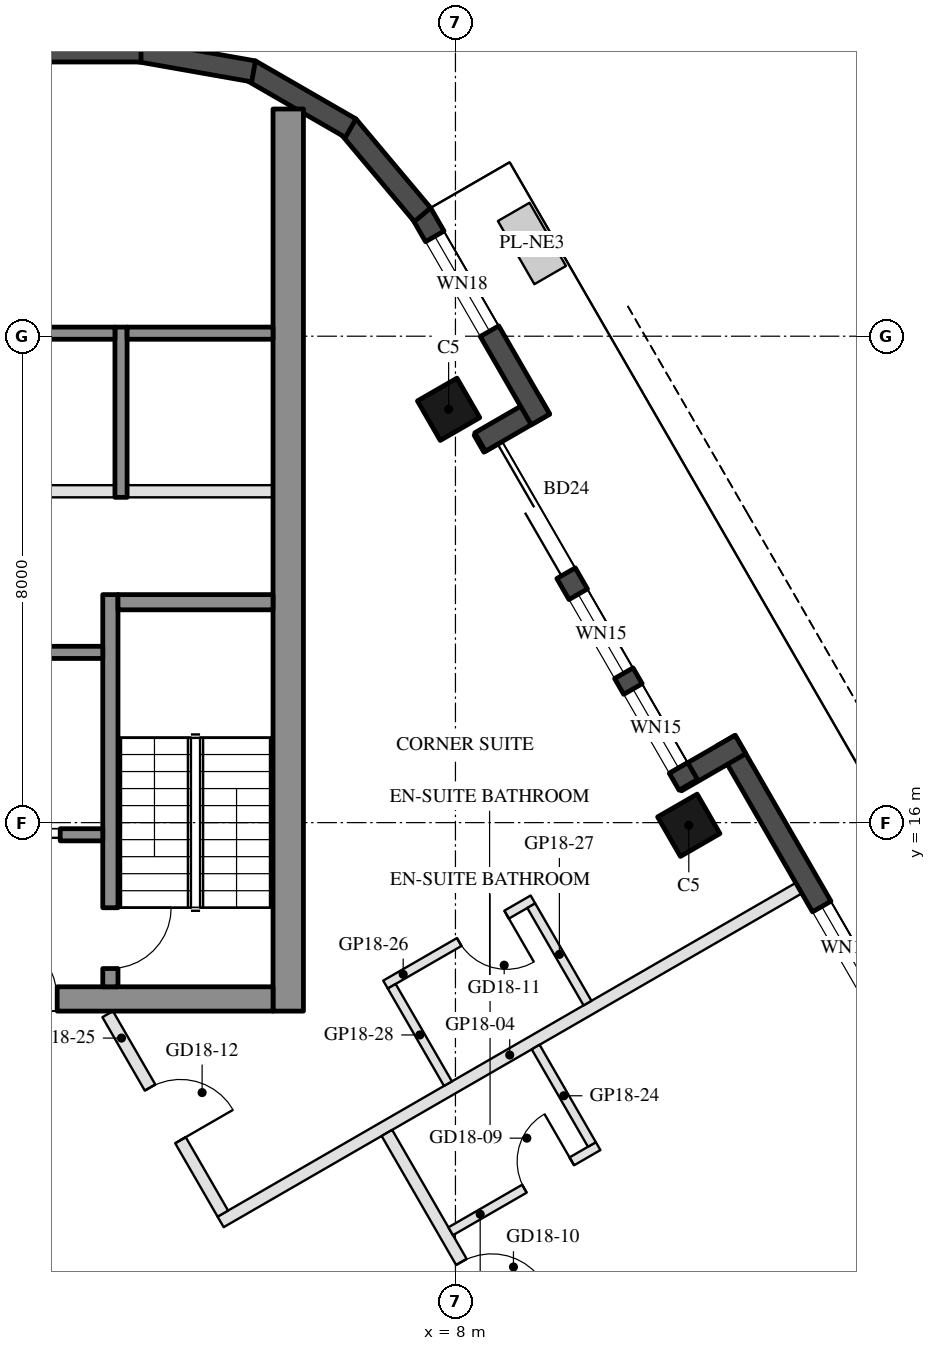
"""IFC4 building model, lengths in metres.
Left out: names, types, materials, properties, quantities, classifications, styles, units other than length and angle.
Written with IfcOpenShell. Run it as: python <this file> out.ifc"""

import sys

from ifc_helpers import new_model, si_unit, direction, frame, frame_2d, origin, origin_2d, place, context, subcontext, project, spatial, rectangle, hollow_rectangle, extrude, element, fill, save


model = new_model("IFC4")
c1 = context("Model", 3, precision=1e-05, world=origin(), true_north=direction((0.0, 1.0)))
c2 = subcontext(c1, "Body", "Model", "MODEL_VIEW")
j1 = project(units=[si_unit("LENGTHUNIT", "METRE"), si_unit("PLANEANGLEUNIT", "RADIAN")], contexts=[c1])
p1 = place(None, origin())
s1 = spatial("IfcSite", under=j1, at=p1, CompositionType="ELEMENT")
p2 = place(p1, origin())
s2 = spatial("IfcBuilding", under=s1, at=p2, CompositionType="ELEMENT")
p3 = place(p2, frame((0.0, 0.0, 198.4)))
s3 = spatial("IfcBuildingStorey", under=s2, at=p3, CompositionType="ELEMENT", Elevation=198.4)
for number, where, z_axis, x_axis in (
    (1, (11.838, 15.957, 0.0), (0.0, 0.0, 1.0), (-0.5, 0.866, 0.0)),
    (2, (7.888, 22.798, 0.0), (0.0, 0.0, 1.0), (-0.5, 0.866, 0.0)),
):
    element("IfcColumn", number, at=place(p3, frame(where, z_axis=z_axis, x_axis=x_axis)), inside=s3, PredefinedType="COLUMN", context=c2, shape_type="SweptSolid", body=[
        extrude(hollow_rectangle(XDim=0.75, YDim=0.75, WallThickness=0.035, at=origin_2d()), origin(), (0.0, 0.0, 1.0), 3.7),
    ])
p4 = place(p3, frame((17.299, 8.948, 0.0), z_axis=(0.0, 0.0, 1.0), x_axis=(-0.500010041276, 0.866019606374, 0.0)))
e3 = element("IfcWall", 3, at=p4, inside=s3, PredefinedType="SOLIDWALL", context=c2, shape_type="SweptSolid", body=[
    extrude(rectangle(XDim=9.7, YDim=0.35, at=frame_2d((4.85, 0.0))), origin(), (0.0, 0.0, 1.0), 3.55),
])
p5 = place(p4, frame((1.737, 0.0, 0.0)))
e4 = element("IfcOpeningElement", 4, at=p5, cuts=e3, PredefinedType="OPENING", context=c2, shape_type="SweptSolid", body=[
    extrude(rectangle(XDim=2.4, YDim=2.4, at=frame_2d((1.2, 1.2))), frame((0.0, 0.185, 0.0), z_axis=(0.0, -1.0, 0.0), x_axis=(1.0, 0.0, 0.0)), (0.0, 0.0, 1.0), 0.37),
])
p6 = place(p4, frame((4.949, 0.0, 0.3)))
e5 = element("IfcOpeningElement", 5, at=p6, cuts=e3, PredefinedType="OPENING", context=c2, shape_type="SweptSolid", body=[
    extrude(rectangle(XDim=1.6, YDim=2.65, at=frame_2d((0.8, 1.325))), frame((0.0, 0.185, 0.0), z_axis=(0.0, -1.0, 0.0), x_axis=(1.0, 0.0, 0.0)), (0.0, 0.0, 1.0), 0.37),
])
p7 = place(p3, frame((12.688, 17.284, 0.0), z_axis=(0.0, 0.0, 1.0), x_axis=(-0.865955602162, -0.500120880472, 0.0)))
e6 = element("IfcWall", 6, at=p7, inside=s3, PredefinedType="SOLIDWALL", context=c2, shape_type="SweptSolid", body=[
    extrude(rectangle(XDim=1.22, YDim=0.35, at=frame_2d((0.61, 0.0))), origin(), (0.0, 0.0, 1.0), 3.55),
])
p8 = place(p3, frame((11.829, 16.621, 0.0), z_axis=(0.0, 0.0, 1.0), x_axis=(-0.500003597184, 0.866023326939, 0.0)))
e7 = element("IfcWall", 7, at=p8, inside=s3, PredefinedType="SOLIDWALL", context=c2, shape_type="SweptSolid", body=[
    extrude(rectangle(XDim=6.74, YDim=0.35, at=frame_2d((3.37, 0.0))), origin(), (0.0, 0.0, 1.0), 3.55),
])
p9 = place(p8, frame((4.02, 0.0, 0.0)))
e8 = element("IfcOpeningElement", 8, at=p9, cuts=e7, PredefinedType="OPENING", context=c2, shape_type="SweptSolid", body=[
    extrude(rectangle(XDim=2.4, YDim=2.4, at=frame_2d((1.2, 1.2))), frame((0.0, 0.185, 0.0), z_axis=(0.0, -1.0, 0.0), x_axis=(1.0, 0.0, 0.0)), (0.0, 0.0, 1.0), 0.37),
])
p10 = place(p8, frame((0.32, 0.0, 0.3)))
e9 = element("IfcOpeningElement", 9, at=p10, cuts=e7, PredefinedType="OPENING", context=c2, shape_type="SweptSolid", body=[
    extrude(rectangle(XDim=1.5, YDim=2.65, at=frame_2d((0.75, 1.325))), frame((0.0, 0.185, 0.0), z_axis=(0.0, -1.0, 0.0), x_axis=(1.0, 0.0, 0.0)), (0.0, 0.0, 1.0), 0.37),
])
p11 = place(p8, frame((2.12, 0.0, 0.3)))
e10 = element("IfcOpeningElement", 10, at=p11, cuts=e7, PredefinedType="OPENING", context=c2, shape_type="SweptSolid", body=[
    extrude(rectangle(XDim=1.5, YDim=2.65, at=frame_2d((0.75, 1.325))), frame((0.0, 0.185, 0.0), z_axis=(0.0, -1.0, 0.0), x_axis=(1.0, 0.0, 0.0)), (0.0, 0.0, 1.0), 0.37),
])
p12 = place(p3, frame((8.406, 22.26, 0.0), z_axis=(0.0, 0.0, 1.0), x_axis=(0.865955602162, 0.500120880472, 0.0)))
e11 = element("IfcWall", 11, at=p12, inside=s3, PredefinedType="SOLIDWALL", context=c2, shape_type="SweptSolid", body=[
    extrude(rectangle(XDim=1.22, YDim=0.35, at=frame_2d((0.61, 0.0))), origin(), (0.0, 0.0, 1.0), 3.55),
])
p13 = place(p3, frame((9.398, 22.631, 0.0), z_axis=(0.0, 0.0, 1.0), x_axis=(-0.499954521343, 0.866051659307, 0.0)))
e12 = element("IfcWall", 12, at=p13, inside=s3, PredefinedType="SOLIDWALL", context=c2, shape_type="SweptSolid", body=[
    extrude(rectangle(XDim=3.916, YDim=0.35, at=frame_2d((1.958, 0.0))), origin(), (0.0, 0.0, 1.0), 3.55),
])
p14 = place(p13, frame((1.676, 0.0, 0.3)))
e13 = element("IfcOpeningElement", 13, at=p14, cuts=e12, PredefinedType="OPENING", context=c2, shape_type="SweptSolid", body=[
    extrude(rectangle(XDim=1.8, YDim=2.65, at=frame_2d((0.9, 1.325))), frame((0.0, 0.185, 0.0), z_axis=(0.0, -1.0, 0.0), x_axis=(1.0, 0.0, 0.0)), (0.0, 0.0, 1.0), 0.37),
])
p15 = place(p3, frame((7.458, 25.998, 0.0), z_axis=(0.0, 0.0, 1.0), x_axis=(-0.642808304945, 0.766027077259, 0.0)))
e14 = element("IfcWall", 14, at=p15, inside=s3, PredefinedType="SOLIDWALL", context=c2, shape_type="SweptSolid", body=[
    extrude(rectangle(XDim=1.91, YDim=0.35, at=frame_2d((0.955, 0.0))), origin(), (0.0, 0.0, 1.0), 3.55),
])
for number, where, z_axis, x_axis in (
    (15, (6.277, 27.422, 0.0), (0.0, 0.0, 1.0), (-0.866, 0.5, 0.0)),
    (16, (4.68, 28.356, 0.0), (0.0, 0.0, 1.0), (-0.985, 0.174, 0.0)),
):
    element("IfcWall", number, at=place(p3, frame(where, z_axis=z_axis, x_axis=x_axis)), inside=s3, PredefinedType="SOLIDWALL", context=c2, shape_type="SweptSolid", body=[
        extrude(rectangle(XDim=1.91, YDim=0.35, at=frame_2d((0.955, 0.0))), origin(), (0.0, 0.0, 1.0), 3.55),
    ])
p16 = place(p3, frame((2.829, 28.685, 0.0), z_axis=(0.0, 0.0, 1.0), x_axis=(-1.0, 0.0, 0.0)))
e17 = element("IfcWall", 17, at=p16, inside=s3, PredefinedType="SOLIDWALL", context=c2, shape_type="SweptSolid", body=[
    extrude(rectangle(XDim=5.658, YDim=0.35, at=frame_2d((2.829, 0.0))), origin(), (0.0, 0.0, 1.0), 3.55),
])
p17 = place(p3, frame((5.25, 12.9, 0.0), z_axis=(0.0, 0.0, 1.0), x_axis=(0.0, 1.0, 0.0)))
e18 = element("IfcWall", 18, at=p17, inside=s3, PredefinedType="SHEAR", context=c2, shape_type="SweptSolid", body=[
    extrude(rectangle(XDim=14.837, YDim=0.5, at=frame_2d((7.418, 0.0))), origin(), (0.0, 0.0, 1.0), 3.5),
])
p18 = place(p3, frame((5.0, 13.1, 0.0), z_axis=(0.0, 0.0, 1.0), x_axis=(-1.0, 0.0, 0.0)))
e19 = element("IfcWall", 19, at=p18, inside=s3, PredefinedType="SHEAR", context=c2, shape_type="SweptSolid", body=[
    extrude(rectangle(XDim=10.0, YDim=0.4, at=frame_2d((5.0, 0.0))), origin(), (0.0, 0.0, 1.0), 3.5),
])
p19 = place(p18, frame((3.55, 0.0, 0.0)))
e20 = element("IfcOpeningElement", 20, at=p19, cuts=e19, PredefinedType="OPENING", context=c2, shape_type="SweptSolid", body=[
    extrude(rectangle(XDim=1.1, YDim=2.1, at=frame_2d((0.55, 1.05))), frame((0.0, 0.21, 0.0), z_axis=(0.0, -1.0, 0.0), x_axis=(1.0, 0.0, 0.0)), (0.0, 0.0, 1.0), 0.42),
])
p20 = place(p18, frame((5.85, 0.0, 0.0)))
e21 = element("IfcOpeningElement", 21, at=p20, cuts=e19, PredefinedType="OPENING", context=c2, shape_type="SweptSolid", body=[
    extrude(rectangle(XDim=1.4, YDim=2.1, at=frame_2d((0.7, 1.05))), frame((0.0, 0.21, 0.0), z_axis=(0.0, -1.0, 0.0), x_axis=(1.0, 0.0, 0.0)), (0.0, 0.0, 1.0), 0.42),
])
p21 = place(p3, frame((2.325, 13.3, 0.0), z_axis=(0.0, 0.0, 1.0), x_axis=(0.0, 1.0, 0.0)))
e22 = element("IfcWall", 22, at=p21, inside=s3, PredefinedType="SHEAR", context=c2, shape_type="SweptSolid", body=[
    extrude(rectangle(XDim=6.45, YDim=0.25, at=frame_2d((3.225, 0.0))), origin(), (0.0, 0.0, 1.0), 3.5),
])
p22 = place(p21, frame((0.3, 0.0, 0.0)))
e23 = element("IfcOpeningElement", 23, at=p22, cuts=e22, PredefinedType="OPENING", context=c2, shape_type="SweptSolid", body=[
    extrude(rectangle(XDim=1.0, YDim=2.1, at=frame_2d((0.5, 1.05))), frame((0.0, 0.135, 0.0), z_axis=(0.0, -1.0, 0.0), x_axis=(1.0, 0.0, 0.0)), (0.0, 0.0, 1.0), 0.27),
])
p23 = place(p3, frame((5.0, 19.625, 0.0), z_axis=(0.0, 0.0, 1.0), x_axis=(-1.0, 0.0, 0.0)))
e24 = element("IfcWall", 24, at=p23, inside=s3, PredefinedType="SHEAR", context=c2, shape_type="SweptSolid", body=[
    extrude(rectangle(XDim=2.55, YDim=0.25, at=frame_2d((1.275, 0.0))), origin(), (0.0, 0.0, 1.0), 3.5),
])
p24 = place(p3, frame((2.2, 18.8, 0.0), z_axis=(0.0, 0.0, 1.0), x_axis=(-1.0, 0.0, 0.0)))
e25 = element("IfcWall", 25, at=p24, inside=s3, PredefinedType="SHEAR", context=c2, shape_type="SweptSolid", body=[
    extrude(rectangle(XDim=2.8, YDim=0.2, at=frame_2d((1.4, 0.0))), origin(), (0.0, 0.0, 1.0), 3.5),
])
p25 = place(p3, frame((2.2, 15.8, 0.0), z_axis=(0.0, 0.0, 1.0), x_axis=(-1.0, 0.0, 0.0)))
e26 = element("IfcWall", 26, at=p25, inside=s3, PredefinedType="SHEAR", context=c2, shape_type="SweptSolid", body=[
    extrude(rectangle(XDim=2.8, YDim=0.2, at=frame_2d((1.4, 0.0))), origin(), (0.0, 0.0, 1.0), 3.5),
])
p26 = place(p25, frame((0.7, 0.0, 0.0)))
e27 = element("IfcOpeningElement", 27, at=p26, cuts=e26, PredefinedType="OPENING", context=c2, shape_type="SweptSolid", body=[
    extrude(rectangle(XDim=1.2, YDim=2.1, at=frame_2d((0.6, 1.05))), frame((0.0, 0.11, 0.0), z_axis=(0.0, -1.0, 0.0), x_axis=(1.0, 0.0, 0.0)), (0.0, 0.0, 1.0), 0.22),
])
p27 = place(p3, frame((2.5, 21.35, 0.0), z_axis=(0.0, 0.0, 1.0), x_axis=(0.0, 1.0, 0.0)))
e28 = element("IfcWall", 28, at=p27, inside=s3, PredefinedType="SHEAR", context=c2, shape_type="SweptSolid", body=[
    extrude(rectangle(XDim=2.8, YDim=0.2, at=frame_2d((1.4, 0.0))), origin(), (0.0, 0.0, 1.0), 3.5),
])
p28 = place(p3, frame((5.0, 24.05, 0.0), z_axis=(0.0, 0.0, 1.0), x_axis=(-1.0, 0.0, 0.0)))
e29 = element("IfcWall", 29, at=p28, inside=s3, PredefinedType="SHEAR", context=c2, shape_type="SweptSolid", body=[
    extrude(rectangle(XDim=2.4, YDim=0.2, at=frame_2d((1.2, 0.0))), origin(), (0.0, 0.0, 1.0), 3.5),
])
p29 = place(p3, frame((2.4, 24.05, 0.0), z_axis=(0.0, 0.0, 1.0), x_axis=(-1.0, 0.0, 0.0)))
e30 = element("IfcWall", 30, at=p29, inside=s3, PredefinedType="SHEAR", context=c2, shape_type="SweptSolid", body=[
    extrude(rectangle(XDim=2.8, YDim=0.2, at=frame_2d((1.4, 0.0))), origin(), (0.0, 0.0, 1.0), 3.5),
])
p30 = place(p3, frame((5.0, 21.45, 0.0), z_axis=(0.0, 0.0, 1.0), x_axis=(-1.0, 0.0, 0.0)))
e31 = element("IfcWall", 31, at=p30, inside=s3, PredefinedType="PARTITIONING", context=c2, shape_type="SweptSolid", body=[
    extrude(rectangle(XDim=2.4, YDim=0.2, at=frame_2d((1.2, 0.0))), origin(), (0.0, 0.0, 1.0), 3.5),
])
p31 = place(p3, frame((2.4, 21.45, 0.0), z_axis=(0.0, 0.0, 1.0), x_axis=(-1.0, 0.0, 0.0)))
e32 = element("IfcWall", 32, at=p31, inside=s3, PredefinedType="PARTITIONING", context=c2, shape_type="SweptSolid", body=[
    extrude(rectangle(XDim=2.8, YDim=0.2, at=frame_2d((1.4, 0.0))), origin(), (0.0, 0.0, 1.0), 3.5),
])
p32 = place(p3, frame((13.647, 14.923, 0.0), z_axis=(0.0, 0.0, 1.0), x_axis=(-0.866027479907, -0.499996404033, 0.0)))
e33 = element("IfcWall", 33, at=p32, inside=s3, PredefinedType="PARTITIONING", context=c2, shape_type="SweptSolid", body=[
    extrude(rectangle(XDim=10.98, YDim=0.2, at=frame_2d((5.49, 0.0))), origin(), (0.0, 0.0, 1.0), 3.06),
])
p33 = place(p3, frame((6.873, 10.896, 0.0), z_axis=(0.0, 0.0, 1.0), x_axis=(0.499987518031, -0.866032610133, 0.0)))
e34 = element("IfcWall", 34, at=p33, inside=s3, PredefinedType="PARTITIONING", context=c2, shape_type="SweptSolid", body=[
    extrude(rectangle(XDim=9.886, YDim=0.2, at=frame_2d((4.943, 0.0))), origin(), (0.0, 0.0, 1.0), 2.95),
])
p34 = place(p33, frame((2.45, 0.0, 0.0)))
e35 = element("IfcOpeningElement", 35, at=p34, cuts=e34, PredefinedType="OPENING", context=c2, shape_type="SweptSolid", body=[
    extrude(rectangle(XDim=1.0, YDim=2.1, at=frame_2d((0.5, 1.05))), frame((0.0, 0.11, 0.0), z_axis=(0.0, -1.0, 0.0), x_axis=(1.0, 0.0, 0.0)), (0.0, 0.0, 1.0), 0.22),
])
p35 = place(p3, frame((7.922, 9.279, 0.0), z_axis=(0.0, 0.0, 1.0), x_axis=(0.865996816683, 0.500049511043, 0.0)))
e36 = element("IfcWall", 36, at=p35, inside=s3, PredefinedType="PARTITIONING", context=c2, shape_type="SweptSolid", body=[
    extrude(rectangle(XDim=2.8, YDim=0.15, at=frame_2d((1.4, 0.0))), origin(), (0.0, 0.0, 1.0), 2.95),
])
p36 = place(p35, frame((1.4, 0.0, 0.0)))
e37 = element("IfcOpeningElement", 37, at=p36, cuts=e36, PredefinedType="OPENING", context=c2, shape_type="SweptSolid", body=[
    extrude(rectangle(XDim=0.9, YDim=2.1, at=frame_2d((0.45, 1.05))), frame((0.0, 0.085, 0.0), z_axis=(0.0, -1.0, 0.0), x_axis=(1.0, 0.0, 0.0)), (0.0, 0.0, 1.0), 0.17),
])
p37 = place(p3, frame((10.244, 10.707, 0.0), z_axis=(0.0, 0.0, 1.0), x_axis=(-0.500042316284, 0.866000971088, 0.0)))
e38 = element("IfcWall", 38, at=p37, inside=s3, PredefinedType="PARTITIONING", context=c2, shape_type="SweptSolid", body=[
    extrude(rectangle(XDim=1.85, YDim=0.15, at=frame_2d((0.925, 0.0))), origin(), (0.0, 0.0, 1.0), 3.55),
])
p38 = place(p3, frame((2.281, 12.85, 0.0), z_axis=(0.0, 0.0, 1.0), x_axis=(0.499979074716, -0.866037484666, 0.0)))
e39 = element("IfcWall", 39, at=p38, inside=s3, PredefinedType="PARTITIONING", context=c2, shape_type="SweptSolid", body=[
    extrude(rectangle(XDim=3.788, YDim=0.2, at=frame_2d((1.894, 0.0))), origin(), (0.0, 0.0, 1.0), 2.95),
])
p39 = place(p38, frame((1.394, 0.0, 0.0)))
e40 = element("IfcOpeningElement", 40, at=p39, cuts=e39, PredefinedType="OPENING", context=c2, shape_type="SweptSolid", body=[
    extrude(rectangle(XDim=1.0, YDim=2.1, at=frame_2d((0.5, 1.05))), frame((0.0, 0.11, 0.0), z_axis=(0.0, -1.0, 0.0), x_axis=(1.0, 0.0, 0.0)), (0.0, 0.0, 1.0), 0.22),
])
p40 = place(p3, frame((9.274, 14.737, 0.0), z_axis=(0.0, 0.0, 1.0), x_axis=(-0.866018616679, -0.500011755427, 0.0)))
e41 = element("IfcWall", 41, at=p40, inside=s3, PredefinedType="PARTITIONING", context=c2, shape_type="SweptSolid", body=[
    extrude(rectangle(XDim=2.8, YDim=0.15, at=frame_2d((1.4, 0.0))), origin(), (0.0, 0.0, 1.0), 3.55),
])
p41 = place(p40, frame((0.5, 0.0, 0.0)))
e42 = element("IfcOpeningElement", 42, at=p41, cuts=e41, PredefinedType="OPENING", context=c2, shape_type="SweptSolid", body=[
    extrude(rectangle(XDim=0.9, YDim=2.1, at=frame_2d((0.45, 1.05))), frame((0.0, 0.085, 0.0), z_axis=(0.0, -1.0, 0.0), x_axis=(1.0, 0.0, 0.0)), (0.0, 0.0, 1.0), 0.17),
])
p42 = place(p3, frame((10.172, 13.032, 0.0), z_axis=(0.0, 0.0, 1.0), x_axis=(-0.500042316284, 0.866000971088, 0.0)))
e43 = element("IfcWall", 43, at=p42, inside=s3, PredefinedType="PARTITIONING", context=c2, shape_type="SweptSolid", body=[
    extrude(rectangle(XDim=1.85, YDim=0.15, at=frame_2d((0.925, 0.0))), origin(), (0.0, 0.0, 1.0), 2.95),
])
p43 = place(p3, frame((7.877, 11.707, 0.0), z_axis=(0.0, 0.0, 1.0), x_axis=(-0.499985172903, 0.866033964044, 0.0)))
e44 = element("IfcWall", 44, at=p43, inside=s3, PredefinedType="PARTITIONING", context=c2, shape_type="SweptSolid", body=[
    extrude(rectangle(XDim=1.85, YDim=0.15, at=frame_2d((0.925, 0.0))), origin(), (0.0, 0.0, 1.0), 2.95),
])
p44 = place(p6, origin())
e45 = element("IfcWindow", 45, at=p44, inside=s3, PartitioningType="SINGLE_PANEL", PredefinedType="WINDOW", context=c2, shape_type="SweptSolid", body=[
    extrude(rectangle(XDim=1.6, YDim=2.65, at=frame_2d((0.8, 1.325))), frame((0.0, 0.03, 0.0), z_axis=(0.0, -1.0, 0.0), x_axis=(1.0, 0.0, 0.0)), (0.0, 0.0, 1.0), 0.06),
])
fill(e5, e45)
p45 = place(p9, frame((2.4, 0.0, 0.0), z_axis=(0.0, 0.0, 1.0), x_axis=(-1.0, 0.0, 0.0)))
e46 = element("IfcDoor", 46, at=p45, inside=s3, OperationType="SLIDING_TO_LEFT", PredefinedType="DOOR", context=c2, shape_type="SweptSolid", body=[
    extrude(rectangle(XDim=2.4, YDim=2.4, at=frame_2d((1.2, 1.2))), frame((0.0, 0.025, 0.0), z_axis=(0.0, -1.0, 0.0), x_axis=(1.0, 0.0, 0.0)), (0.0, 0.0, 1.0), 0.05),
])
fill(e8, e46)
p46 = place(p10, origin())
e47 = element("IfcWindow", 47, at=p46, inside=s3, PartitioningType="SINGLE_PANEL", PredefinedType="WINDOW", context=c2, shape_type="SweptSolid", body=[
    extrude(rectangle(XDim=1.5, YDim=2.65, at=frame_2d((0.75, 1.325))), frame((0.0, 0.03, 0.0), z_axis=(0.0, -1.0, 0.0), x_axis=(1.0, 0.0, 0.0)), (0.0, 0.0, 1.0), 0.06),
])
fill(e9, e47)
p47 = place(p11, origin())
e48 = element("IfcWindow", 48, at=p47, inside=s3, PartitioningType="SINGLE_PANEL", PredefinedType="WINDOW", context=c2, shape_type="SweptSolid", body=[
    extrude(rectangle(XDim=1.5, YDim=2.65, at=frame_2d((0.75, 1.325))), frame((0.0, 0.03, 0.0), z_axis=(0.0, -1.0, 0.0), x_axis=(1.0, 0.0, 0.0)), (0.0, 0.0, 1.0), 0.06),
])
fill(e10, e48)
p48 = place(p14, origin())
e49 = element("IfcWindow", 49, at=p48, inside=s3, PartitioningType="SINGLE_PANEL", PredefinedType="WINDOW", context=c2, shape_type="SweptSolid", body=[
    extrude(rectangle(XDim=1.8, YDim=2.65, at=frame_2d((0.9, 1.325))), frame((0.0, 0.03, 0.0), z_axis=(0.0, -1.0, 0.0), x_axis=(1.0, 0.0, 0.0)), (0.0, 0.0, 1.0), 0.06),
])
fill(e13, e49)
p49 = place(p26, origin())
e50 = element("IfcDoor", 50, at=p49, inside=s3, OperationType="DOUBLE_DOOR_SLIDING", PredefinedType="DOOR", context=c2, shape_type="SweptSolid", body=[
    extrude(rectangle(XDim=1.2, YDim=2.1, at=frame_2d((0.6, 1.05))), frame((0.0, 0.025, 0.0), z_axis=(0.0, -1.0, 0.0), x_axis=(1.0, 0.0, 0.0)), (0.0, 0.0, 1.0), 0.05),
])
fill(e27, e50)
p50 = place(p19, frame((1.1, 0.0, 0.0), z_axis=(0.0, 0.0, 1.0), x_axis=(-1.0, 0.0, 0.0)))
e51 = element("IfcDoor", 51, at=p50, inside=s3, OperationType="SINGLE_SWING_LEFT", PredefinedType="DOOR", context=c2, shape_type="SweptSolid", body=[
    extrude(rectangle(XDim=1.1, YDim=2.1, at=frame_2d((0.55, 1.05))), frame((0.0, 0.025, 0.0), z_axis=(0.0, -1.0, 0.0), x_axis=(1.0, 0.0, 0.0)), (0.0, 0.0, 1.0), 0.05),
])
fill(e20, e51)
p51 = place(p22, frame((1.0, 0.0, 0.0), z_axis=(0.0, 0.0, 1.0), x_axis=(-1.0, 0.0, 0.0)))
e52 = element("IfcDoor", 52, at=p51, inside=s3, OperationType="SINGLE_SWING_LEFT", PredefinedType="DOOR", context=c2, shape_type="SweptSolid", body=[
    extrude(rectangle(XDim=1.0, YDim=2.1, at=frame_2d((0.5, 1.05))), frame((0.0, 0.025, 0.0), z_axis=(0.0, -1.0, 0.0), x_axis=(1.0, 0.0, 0.0)), (0.0, 0.0, 1.0), 0.05),
])
fill(e23, e52)
p52 = place(p36, origin())
e53 = element("IfcDoor", 53, at=p52, inside=s3, OperationType="SINGLE_SWING_RIGHT", PredefinedType="DOOR", context=c2, shape_type="SweptSolid", body=[
    extrude(rectangle(XDim=0.9, YDim=2.1, at=frame_2d((0.45, 1.05))), frame((0.0, 0.025, 0.0), z_axis=(0.0, -1.0, 0.0), x_axis=(1.0, 0.0, 0.0)), (0.0, 0.0, 1.0), 0.05),
])
fill(e37, e53)
p53 = place(p34, origin())
e54 = element("IfcDoor", 54, at=p53, inside=s3, OperationType="SINGLE_SWING_RIGHT", PredefinedType="DOOR", context=c2, shape_type="SweptSolid", body=[
    extrude(rectangle(XDim=1.0, YDim=2.1, at=frame_2d((0.5, 1.05))), frame((0.0, 0.025, 0.0), z_axis=(0.0, -1.0, 0.0), x_axis=(1.0, 0.0, 0.0)), (0.0, 0.0, 1.0), 0.05),
])
fill(e35, e54)
p54 = place(p41, origin())
e55 = element("IfcDoor", 55, at=p54, inside=s3, OperationType="SINGLE_SWING_LEFT", PredefinedType="DOOR", context=c2, shape_type="SweptSolid", body=[
    extrude(rectangle(XDim=0.9, YDim=2.1, at=frame_2d((0.45, 1.05))), frame((0.0, 0.025, 0.0), z_axis=(0.0, -1.0, 0.0), x_axis=(1.0, 0.0, 0.0)), (0.0, 0.0, 1.0), 0.05),
])
fill(e42, e55)
p55 = place(p39, origin())
e56 = element("IfcDoor", 56, at=p55, inside=s3, OperationType="SINGLE_SWING_RIGHT", PredefinedType="DOOR", context=c2, shape_type="SweptSolid", body=[
    extrude(rectangle(XDim=1.0, YDim=2.1, at=frame_2d((0.5, 1.05))), frame((0.0, 0.025, 0.0), z_axis=(0.0, -1.0, 0.0), x_axis=(1.0, 0.0, 0.0)), (0.0, 0.0, 1.0), 0.05),
])
fill(e40, e56)
save(model, sys.argv[1])
